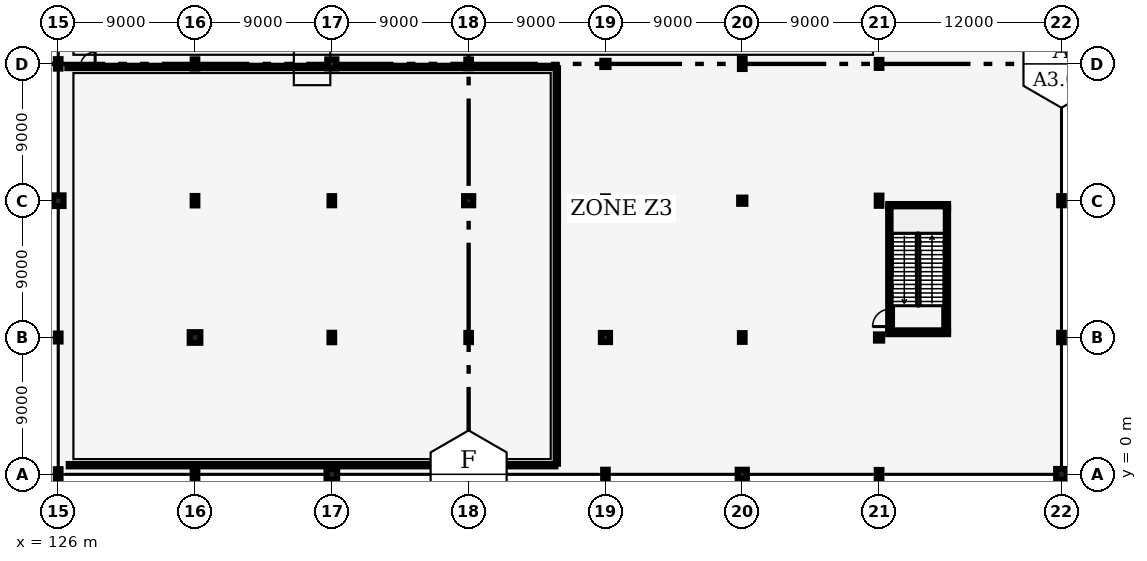
"""IFC4 building model, lengths in metres.
Left out: names, types, materials, properties, quantities, classifications, styles, units other than length and angle.
Written with IfcOpenShell. Run it as: python <this file> out.ifc"""

import sys

from ifc_helpers import new_model, si_unit, direction, frame, frame_2d, origin, origin_2d, place, context, subcontext, project, spatial, rectangle, hollow_circle, i_section, extrude, element, fill, save


model = new_model("IFC4")
c1 = context("Model", 3, precision=1e-05, world=origin(), true_north=direction((0.0, 1.0)))
c2 = subcontext(c1, "Body", "Model", "MODEL_VIEW")
j1 = project(units=[si_unit("LENGTHUNIT", "METRE"), si_unit("PLANEANGLEUNIT", "RADIAN")], contexts=[c1])
p1 = place(None, origin())
s1 = spatial("IfcSite", under=j1, at=p1, CompositionType="ELEMENT")
p2 = place(p1, origin())
s2 = spatial("IfcBuilding", under=s1, at=p2, CompositionType="ELEMENT")
p3 = place(p2, frame((0.0, 0.0, 6.0)))
s3 = spatial("IfcBuildingStorey", under=s2, at=p3, CompositionType="ELEMENT", Elevation=6.0)
p4 = place(p3, frame((126.0, 0.0, 0.0), z_axis=(0.0, 0.0, 1.0), x_axis=(1.0, 0.0, 0.0)))
e1 = element("IfcColumn", 1, at=p4, inside=s3, PredefinedType="COLUMN", context=c2, shape_type="SweptSolid", body=[
    extrude(i_section(OverallWidth=0.305, OverallDepth=0.668, WebThickness=0.021, FlangeThickness=0.04, FilletRadius=0.027, at=origin_2d()), origin(), (0.0, 0.0, 1.0), 6.0),
])
p5 = place(p3, frame((126.0, 9.0, 0.0), z_axis=(0.0, 0.0, 1.0), x_axis=(1.0, 0.0, 0.0)))
e2 = element("IfcColumn", 2, at=p5, inside=s3, PredefinedType="COLUMN", context=c2, shape_type="SweptSolid", body=[
    extrude(i_section(OverallWidth=0.306, OverallDepth=0.524, WebThickness=0.021, FlangeThickness=0.04, FilletRadius=0.027, at=origin_2d()), origin(), (0.0, 0.0, 1.0), 6.0),
])
p6 = place(p3, frame((126.0, 18.0, 0.0), z_axis=(0.0, 0.0, 1.0), x_axis=(1.0, 0.0, 0.0)))
e3 = element("IfcColumn", 3, at=p6, inside=s3, PredefinedType="COLUMN", context=c2, shape_type="SweptSolid", body=[
    extrude(rectangle(XDim=0.7, YDim=0.7, at=origin_2d()), origin(), (0.0, 0.0, 1.0), 6.0),
])
p7 = place(p3, frame((126.0, 27.0, 0.0), z_axis=(0.0, 0.0, 1.0), x_axis=(1.0, 0.0, 0.0)))
e4 = element("IfcColumn", 4, at=p7, inside=s3, PredefinedType="COLUMN", context=c2, shape_type="SweptSolid", body=[
    extrude(i_section(OverallWidth=0.305, OverallDepth=0.62, WebThickness=0.021, FlangeThickness=0.04, FilletRadius=0.027, at=origin_2d()), origin(), (0.0, 0.0, 1.0), 6.0),
])
p8 = place(p3, frame((135.0, 0.0, 0.0), z_axis=(0.0, 0.0, 1.0), x_axis=(1.0, 0.0, 0.0)))
e5 = element("IfcColumn", 5, at=p8, inside=s3, PredefinedType="COLUMN", context=c2, shape_type="SweptSolid", body=[
    extrude(i_section(OverallWidth=0.306, OverallDepth=0.524, WebThickness=0.021, FlangeThickness=0.04, FilletRadius=0.027, at=origin_2d()), origin(), (0.0, 0.0, 1.0), 6.0),
])
p9 = place(p3, frame((135.0, 9.0, 0.0), z_axis=(0.0, 0.0, 1.0), x_axis=(1.0, 0.0, 0.0)))
e6 = element("IfcColumn", 6, at=p9, inside=s3, PredefinedType="COLUMN", context=c2, shape_type="SweptSolid", body=[
    extrude(rectangle(XDim=0.7, YDim=0.7, at=origin_2d()), origin(), (0.0, 0.0, 1.0), 6.0),
])
p10 = place(p3, frame((135.0, 18.0, 0.0), z_axis=(0.0, 0.0, 1.0), x_axis=(1.0, 0.0, 0.0)))
e7 = element("IfcColumn", 7, at=p10, inside=s3, PredefinedType="COLUMN", context=c2, shape_type="SweptSolid", body=[
    extrude(i_section(OverallWidth=0.305, OverallDepth=0.62, WebThickness=0.021, FlangeThickness=0.04, FilletRadius=0.027, at=origin_2d()), origin(), (0.0, 0.0, 1.0), 6.0),
])
p11 = place(p3, frame((135.0, 27.0, 0.0), z_axis=(0.0, 0.0, 1.0), x_axis=(1.0, 0.0, 0.0)))
e8 = element("IfcColumn", 8, at=p11, inside=s3, PredefinedType="COLUMN", context=c2, shape_type="SweptSolid", body=[
    extrude(i_section(OverallWidth=0.3, OverallDepth=0.6, WebThickness=0.015, FlangeThickness=0.03, FilletRadius=0.027, at=origin_2d()), origin(), (0.0, 0.0, 1.0), 6.0),
])
p12 = place(p3, frame((144.0, 0.0, 0.0), z_axis=(0.0, 0.0, 1.0), x_axis=(1.0, 0.0, 0.0)))
e9 = element("IfcColumn", 9, at=p12, inside=s3, PredefinedType="COLUMN", context=c2, shape_type="SweptSolid", body=[
    extrude(rectangle(XDim=0.7, YDim=0.7, at=origin_2d()), origin(), (0.0, 0.0, 1.0), 6.0),
])
p13 = place(p3, frame((144.0, 9.0, 0.0), z_axis=(0.0, 0.0, 1.0), x_axis=(1.0, 0.0, 0.0)))
e10 = element("IfcColumn", 10, at=p13, inside=s3, PredefinedType="COLUMN", context=c2, shape_type="SweptSolid", body=[
    extrude(i_section(OverallWidth=0.305, OverallDepth=0.62, WebThickness=0.021, FlangeThickness=0.04, FilletRadius=0.027, at=origin_2d()), origin(), (0.0, 0.0, 1.0), 6.0),
])
p14 = place(p3, frame((144.0, 18.0, 0.0), z_axis=(0.0, 0.0, 1.0), x_axis=(1.0, 0.0, 0.0)))
e11 = element("IfcColumn", 11, at=p14, inside=s3, PredefinedType="COLUMN", context=c2, shape_type="SweptSolid", body=[
    extrude(i_section(OverallWidth=0.3, OverallDepth=0.6, WebThickness=0.015, FlangeThickness=0.03, FilletRadius=0.027, at=origin_2d()), origin(), (0.0, 0.0, 1.0), 6.0),
])
p15 = place(p3, frame((144.0, 27.0, 0.0), z_axis=(0.0, 0.0, 1.0), x_axis=(1.0, 0.0, 0.0)))
e12 = element("IfcColumn", 12, at=p15, inside=s3, PredefinedType="COLUMN", context=c2, shape_type="SweptSolid", body=[
    extrude(rectangle(XDim=0.6, YDim=0.6, at=origin_2d()), origin(), (0.0, 0.0, 1.0), 6.0),
])
p16 = place(p3, frame((153.0, 0.0, 0.0), z_axis=(0.0, 0.0, 1.0), x_axis=(1.0, 0.0, 0.0)))
e13 = element("IfcColumn", 13, at=p16, inside=s3, PredefinedType="COLUMN", context=c2, shape_type="SweptSolid", body=[
    extrude(i_section(OverallWidth=0.305, OverallDepth=0.62, WebThickness=0.021, FlangeThickness=0.04, FilletRadius=0.027, at=origin_2d()), origin(), (0.0, 0.0, 1.0), 6.0),
])
p17 = place(p3, frame((153.0, 9.0, 0.0), z_axis=(0.0, 0.0, 1.0), x_axis=(1.0, 0.0, 0.0)))
e14 = element("IfcColumn", 14, at=p17, inside=s3, PredefinedType="COLUMN", context=c2, shape_type="SweptSolid", body=[
    extrude(i_section(OverallWidth=0.3, OverallDepth=0.6, WebThickness=0.015, FlangeThickness=0.03, FilletRadius=0.027, at=origin_2d()), origin(), (0.0, 0.0, 1.0), 6.0),
])
p18 = place(p3, frame((153.0, 18.0, 0.0), z_axis=(0.0, 0.0, 1.0), x_axis=(1.0, 0.0, 0.0)))
e15 = element("IfcColumn", 15, at=p18, inside=s3, PredefinedType="COLUMN", context=c2, shape_type="SweptSolid", body=[
    extrude(rectangle(XDim=0.6, YDim=0.6, at=origin_2d()), origin(), (0.0, 0.0, 1.0), 6.0),
])
p19 = place(p3, frame((153.0, 27.0, 0.0), z_axis=(0.0, 0.0, 1.0), x_axis=(1.0, 0.0, 0.0)))
e16 = element("IfcColumn", 16, at=p19, inside=s3, PredefinedType="COLUMN", context=c2, shape_type="SweptSolid", body=[
    extrude(i_section(OverallWidth=0.306, OverallDepth=0.572, WebThickness=0.021, FlangeThickness=0.04, FilletRadius=0.027, at=origin_2d()), origin(), (0.0, 0.0, 1.0), 6.0),
])
p20 = place(p3, frame((162.0, 0.0, 0.0), z_axis=(0.0, 0.0, 1.0), x_axis=(1.0, 0.0, 0.0)))
e17 = element("IfcColumn", 17, at=p20, inside=s3, PredefinedType="COLUMN", context=c2, shape_type="SweptSolid", body=[
    extrude(i_section(OverallWidth=0.3, OverallDepth=0.6, WebThickness=0.015, FlangeThickness=0.03, FilletRadius=0.027, at=origin_2d()), origin(), (0.0, 0.0, 1.0), 6.0),
])
p21 = place(p3, frame((162.0, 9.0, 0.0), z_axis=(0.0, 0.0, 1.0), x_axis=(1.0, 0.0, 0.0)))
e18 = element("IfcColumn", 18, at=p21, inside=s3, PredefinedType="COLUMN", context=c2, shape_type="SweptSolid", body=[
    extrude(rectangle(XDim=0.6, YDim=0.6, at=origin_2d()), origin(), (0.0, 0.0, 1.0), 6.0),
])
p22 = place(p3, frame((162.0, 18.0, 0.0), z_axis=(0.0, 0.0, 1.0), x_axis=(1.0, 0.0, 0.0)))
e19 = element("IfcColumn", 19, at=p22, inside=s3, PredefinedType="COLUMN", context=c2, shape_type="SweptSolid", body=[
    extrude(i_section(OverallWidth=0.306, OverallDepth=0.572, WebThickness=0.021, FlangeThickness=0.04, FilletRadius=0.027, at=origin_2d()), origin(), (0.0, 0.0, 1.0), 6.0),
])
p23 = place(p3, frame((162.0, 27.0, 0.0), z_axis=(0.0, 0.0, 1.0), x_axis=(1.0, 0.0, 0.0)))
e20 = element("IfcColumn", 20, at=p23, inside=s3, PredefinedType="COLUMN", context=c2, shape_type="SweptSolid", body=[
    extrude(hollow_circle(Radius=0.203, WallThickness=0.016, at=origin_2d()), origin(), (0.0, 0.0, 1.0), 6.0),
])
p24 = place(p3, frame((171.0, 0.0, 0.0), z_axis=(0.0, 0.0, 1.0), x_axis=(1.0, 0.0, 0.0)))
e21 = element("IfcColumn", 21, at=p24, inside=s3, PredefinedType="COLUMN", context=c2, shape_type="SweptSolid", body=[
    extrude(rectangle(XDim=0.6, YDim=0.6, at=origin_2d()), origin(), (0.0, 0.0, 1.0), 6.0),
])
p25 = place(p3, frame((171.0, 9.0, 0.0), z_axis=(0.0, 0.0, 1.0), x_axis=(1.0, 0.0, 0.0)))
e22 = element("IfcColumn", 22, at=p25, inside=s3, PredefinedType="COLUMN", context=c2, shape_type="SweptSolid", body=[
    extrude(i_section(OverallWidth=0.306, OverallDepth=0.572, WebThickness=0.021, FlangeThickness=0.04, FilletRadius=0.027, at=origin_2d()), origin(), (0.0, 0.0, 1.0), 6.0),
])
p26 = place(p3, frame((171.0, 18.0, 0.0), z_axis=(0.0, 0.0, 1.0), x_axis=(1.0, 0.0, 0.0)))
e23 = element("IfcColumn", 23, at=p26, inside=s3, PredefinedType="COLUMN", context=c2, shape_type="SweptSolid", body=[
    extrude(hollow_circle(Radius=0.203, WallThickness=0.016, at=origin_2d()), origin(), (0.0, 0.0, 1.0), 6.0),
])
p27 = place(p3, frame((171.0, 27.0, 0.0), z_axis=(0.0, 0.0, 1.0), x_axis=(1.0, 0.0, 0.0)))
e24 = element("IfcColumn", 24, at=p27, inside=s3, PredefinedType="COLUMN", context=c2, shape_type="SweptSolid", body=[
    extrude(i_section(OverallWidth=0.305, OverallDepth=0.668, WebThickness=0.021, FlangeThickness=0.04, FilletRadius=0.027, at=origin_2d()), origin(), (0.0, 0.0, 1.0), 6.0),
])
p28 = place(p3, frame((180.0, 0.0, 0.0), z_axis=(0.0, 0.0, 1.0), x_axis=(1.0, 0.0, 0.0)))
e25 = element("IfcColumn", 25, at=p28, inside=s3, PredefinedType="COLUMN", context=c2, shape_type="SweptSolid", body=[
    extrude(i_section(OverallWidth=0.306, OverallDepth=0.572, WebThickness=0.021, FlangeThickness=0.04, FilletRadius=0.027, at=origin_2d()), origin(), (0.0, 0.0, 1.0), 6.0),
])
p29 = place(p3, frame((180.0, 9.0, 0.0), z_axis=(0.0, 0.0, 1.0), x_axis=(1.0, 0.0, 0.0)))
e26 = element("IfcColumn", 26, at=p29, inside=s3, PredefinedType="COLUMN", context=c2, shape_type="SweptSolid", body=[
    extrude(hollow_circle(Radius=0.203, WallThickness=0.016, at=origin_2d()), origin(), (0.0, 0.0, 1.0), 6.0),
])
p30 = place(p3, frame((180.0, 18.0, 0.0), z_axis=(0.0, 0.0, 1.0), x_axis=(1.0, 0.0, 0.0)))
e27 = element("IfcColumn", 27, at=p30, inside=s3, PredefinedType="COLUMN", context=c2, shape_type="SweptSolid", body=[
    extrude(i_section(OverallWidth=0.305, OverallDepth=0.668, WebThickness=0.021, FlangeThickness=0.04, FilletRadius=0.027, at=origin_2d()), origin(), (0.0, 0.0, 1.0), 6.0),
])
p31 = place(p3, frame((180.0, 27.0, 0.0), z_axis=(0.0, 0.0, 1.0), x_axis=(1.0, 0.0, 0.0)))
e28 = element("IfcColumn", 28, at=p31, inside=s3, PredefinedType="COLUMN", context=c2, shape_type="SweptSolid", body=[
    extrude(i_section(OverallWidth=0.306, OverallDepth=0.524, WebThickness=0.021, FlangeThickness=0.04, FilletRadius=0.027, at=origin_2d()), origin(), (0.0, 0.0, 1.0), 6.0),
])
p32 = place(p3, frame((192.0, 0.0, 0.0), z_axis=(0.0, 0.0, 1.0), x_axis=(1.0, 0.0, 0.0)))
e29 = element("IfcColumn", 29, at=p32, inside=s3, PredefinedType="COLUMN", context=c2, shape_type="SweptSolid", body=[
    extrude(rectangle(XDim=0.7, YDim=0.7, at=origin_2d()), origin(), (0.0, 0.0, 1.0), 6.0),
])
p33 = place(p3, frame((192.0, 9.0, 0.0), z_axis=(0.0, 0.0, 1.0), x_axis=(1.0, 0.0, 0.0)))
e30 = element("IfcColumn", 30, at=p33, inside=s3, PredefinedType="COLUMN", context=c2, shape_type="SweptSolid", body=[
    extrude(i_section(OverallWidth=0.305, OverallDepth=0.62, WebThickness=0.021, FlangeThickness=0.04, FilletRadius=0.027, at=origin_2d()), origin(), (0.0, 0.0, 1.0), 6.0),
])
p34 = place(p3, frame((192.0, 18.0, 0.0), z_axis=(0.0, 0.0, 1.0), x_axis=(1.0, 0.0, 0.0)))
e31 = element("IfcColumn", 31, at=p34, inside=s3, PredefinedType="COLUMN", context=c2, shape_type="SweptSolid", body=[
    extrude(i_section(OverallWidth=0.3, OverallDepth=0.6, WebThickness=0.015, FlangeThickness=0.03, FilletRadius=0.027, at=origin_2d()), origin(), (0.0, 0.0, 1.0), 6.0),
])
p35 = place(p3, frame((192.0, 27.0, 0.0), z_axis=(0.0, 0.0, 1.0), x_axis=(1.0, 0.0, 0.0)))
e32 = element("IfcColumn", 32, at=p35, inside=s3, PredefinedType="COLUMN", context=c2, shape_type="SweptSolid", body=[
    extrude(rectangle(XDim=0.6, YDim=0.6, at=origin_2d()), origin(), (0.0, 0.0, 1.0), 6.0),
])
p36 = place(p3, frame((180.725, 9.47, 0.0), z_axis=(0.0, 0.0, 1.0), x_axis=(0.0, 1.0, 0.0)))
e33 = element("IfcWall", 33, at=p36, inside=s3, PredefinedType="SHEAR", context=c2, shape_type="SweptSolid", body=[
    extrude(rectangle(XDim=8.06, YDim=0.25, at=frame_2d((4.03, 0.0))), origin(), (0.0, 0.0, 1.0), 5.63),
])
p37 = place(p36, frame((0.25, 0.0, 0.0)))
e34 = element("IfcOpeningElement", 34, at=p37, cuts=e33, PredefinedType="OPENING", context=c2, shape_type="SweptSolid", body=[
    extrude(rectangle(XDim=1.15, YDim=2.15, at=frame_2d((0.575, 1.075))), frame((0.0, 0.135, 0.0), z_axis=(0.0, -1.0, 0.0), x_axis=(1.0, 0.0, 0.0)), (0.0, 0.0, 1.0), 0.27),
])
p38 = place(p3, frame((184.415, 9.47, 0.0), z_axis=(0.0, 0.0, 1.0), x_axis=(0.0, 1.0, 0.0)))
e35 = element("IfcWall", 35, at=p38, inside=s3, PredefinedType="SHEAR", context=c2, shape_type="SweptSolid", body=[
    extrude(rectangle(XDim=8.06, YDim=0.25, at=frame_2d((4.03, 0.0))), origin(), (0.0, 0.0, 1.0), 5.63),
])
for number, where, z_axis, x_axis in (
    (36, (180.6, 9.345, 0.0), (0.0, 0.0, 1.0), (1.0, 0.0, 0.0)),
    (37, (180.6, 17.655, 0.0), (0.0, 0.0, 1.0), (1.0, 0.0, 0.0)),
):
    element("IfcWall", number, at=place(p3, frame(where, z_axis=z_axis, x_axis=x_axis)), inside=s3, PredefinedType="SHEAR", context=c2, shape_type="SweptSolid", body=[
        extrude(rectangle(XDim=3.94, YDim=0.25, at=frame_2d((1.97, 0.0))), origin(), (0.0, 0.0, 1.0), 5.63),
    ])
p39 = place(p3, frame((126.6, 26.8, 0.0), z_axis=(0.0, 0.0, 1.0), x_axis=(1.0, 0.0, 0.0)))
e38 = element("IfcWall", 38, at=p39, inside=s3, PredefinedType="PARTITIONING", context=c2, shape_type="SweptSolid", body=[
    extrude(rectangle(XDim=32.2, YDim=0.155, at=frame_2d((16.1, 0.0))), origin(), (0.0, 0.0, 1.0), 4.85),
])
p40 = place(p39, frame((0.85, 0.0, 0.0)))
e39 = element("IfcOpeningElement", 39, at=p40, cuts=e38, PredefinedType="OPENING", context=c2, shape_type="SweptSolid", body=[
    extrude(rectangle(XDim=0.98, YDim=2.12, at=frame_2d((0.49, 1.06))), frame((0.0, 0.087, 0.0), z_axis=(0.0, -1.0, 0.0), x_axis=(1.0, 0.0, 0.0)), (0.0, 0.0, 1.0), 0.175),
])
p41 = place(p3, frame((126.693, 0.6, 0.0), z_axis=(0.0, 0.0, 1.0), x_axis=(1.0, 0.0, 0.0)))
e40 = element("IfcWall", 40, at=p41, inside=s3, PredefinedType="PARTITIONING", context=c2, shape_type="SweptSolid", body=[
    extrude(rectangle(XDim=32.014, YDim=0.155, at=frame_2d((16.007, 0.0))), origin(), (0.0, 0.0, 1.0), 4.85),
])
p42 = place(p3, frame((158.8, 0.693, 0.0), z_axis=(0.0, 0.0, 1.0), x_axis=(0.0, 1.0, 0.0)))
e41 = element("IfcWall", 41, at=p42, inside=s3, PredefinedType="PARTITIONING", context=c2, shape_type="SweptSolid", body=[
    extrude(rectangle(XDim=26.014, YDim=0.155, at=frame_2d((13.007, 0.0))), origin(), (0.0, 0.0, 1.0), 4.85),
])
p43 = place(p37, origin())
e42 = element("IfcDoor", 42, at=p43, inside=s3, OperationType="SINGLE_SWING_LEFT", PredefinedType="DOOR", context=c2, shape_type="SweptSolid", body=[
    extrude(rectangle(XDim=1.15, YDim=2.15, at=frame_2d((0.575, 1.075))), frame((0.0, 0.025, 0.0), z_axis=(0.0, -1.0, 0.0), x_axis=(1.0, 0.0, 0.0)), (0.0, 0.0, 1.0), 0.05),
])
fill(e34, e42)
p44 = place(p40, origin())
e43 = element("IfcDoor", 43, at=p44, inside=s3, OperationType="SINGLE_SWING_RIGHT", PredefinedType="DOOR", context=c2, shape_type="SweptSolid", body=[
    extrude(rectangle(XDim=0.98, YDim=2.12, at=frame_2d((0.49, 1.06))), frame((0.0, 0.025, 0.0), z_axis=(0.0, -1.0, 0.0), x_axis=(1.0, 0.0, 0.0)), (0.0, 0.0, 1.0), 0.05),
])
fill(e39, e43)
save(model, sys.argv[1])
